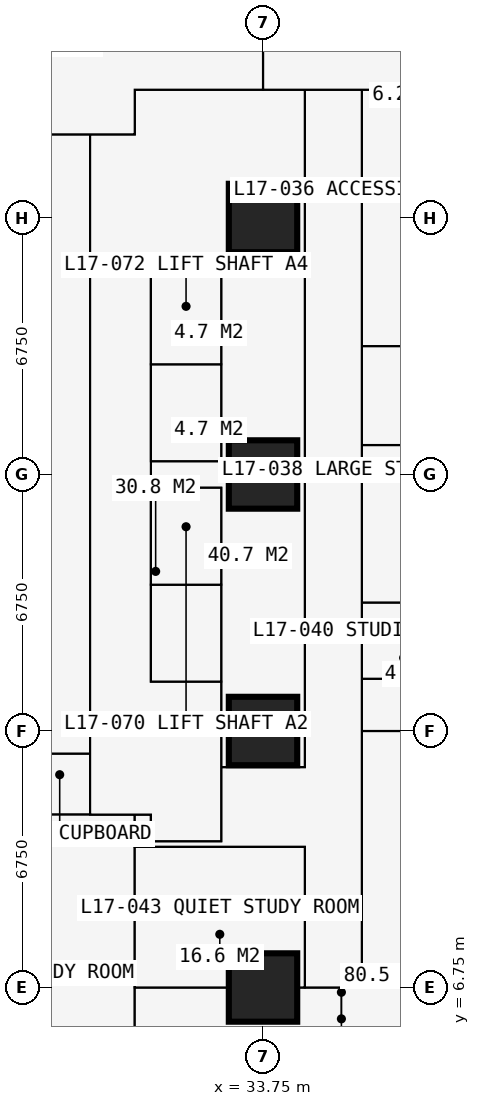
"""IFC4 building model, lengths in metres.
Left out: names, types, materials, properties, quantities, classifications, styles, units other than length and angle.
Written with IfcOpenShell. Run it as: python <this file> out.ifc"""

import sys

from ifc_helpers import new_model, si_unit, direction, frame, frame_2d, origin, origin_2d, place, context, subcontext, project, spatial, rectangle, extrude, element, fill, save


model = new_model("IFC4")
c1 = context("Model", 3, precision=1e-05, world=origin(), true_north=direction((0.0, 1.0)))
c2 = subcontext(c1, "Body", "Model", "MODEL_VIEW")
j1 = project(units=[si_unit("LENGTHUNIT", "METRE"), si_unit("PLANEANGLEUNIT", "RADIAN")], contexts=[c1])
p1 = place(None, origin())
s1 = spatial("IfcSite", under=j1, at=p1, CompositionType="ELEMENT")
p2 = place(p1, origin())
s2 = spatial("IfcBuilding", under=s1, at=p2, CompositionType="ELEMENT")
p3 = place(p2, frame((0.0, 0.0, 64.8)))
s3 = spatial("IfcBuildingStorey", under=s2, at=p3, CompositionType="ELEMENT", Elevation=64.8)
for number, where, z_axis, x_axis in (
    (1, (33.75, 6.75, 0.0), (0.0, 0.0, 1.0), (1.0, 0.0, 0.0)),
    (2, (33.75, 13.5, 0.0), (0.0, 0.0, 1.0), (1.0, 0.0, 0.0)),
    (3, (33.75, 20.25, 0.0), (0.0, 0.0, 1.0), (1.0, 0.0, 0.0)),
    (4, (33.75, 27.0, 0.0), (0.0, 0.0, 1.0), (1.0, 0.0, 0.0)),
):
    element("IfcColumn", number, at=place(p3, frame(where, z_axis=z_axis, x_axis=x_axis)), inside=s3, PredefinedType="COLUMN", context=c2, shape_type="SweptSolid", body=[
        extrude(rectangle(XDim=1.8, YDim=1.8, at=origin_2d()), origin(), (0.0, 0.0, 1.0), 3.6),
    ])
p4 = place(p3, frame((10.125, 11.3, 0.0), z_axis=(0.0, 0.0, 1.0), x_axis=(1.0, 0.0, 0.0)))
e5 = element("IfcWall", 5, at=p4, inside=s3, PredefinedType="PARTITIONING", context=c2, shape_type="SweptSolid", body=[
    extrude(rectangle(XDim=20.675, YDim=0.15, at=frame_2d((10.337, 0.0))), origin(), (0.0, 0.0, 1.0), 3.375),
])
p5 = place(p4, frame((8.375, 0.0, 0.0)))
e6 = element("IfcOpeningElement", 6, at=p5, cuts=e5, PredefinedType="OPENING", context=c2, shape_type="SweptSolid", body=[
    extrude(rectangle(XDim=1.0, YDim=2.2, at=frame_2d((0.5, 1.1))), frame((0.0, 0.085, 0.0), z_axis=(0.0, -1.0, 0.0), x_axis=(1.0, 0.0, 0.0)), (0.0, 0.0, 1.0), 0.17),
])
p6 = place(p4, frame((10.975, 0.0, 0.0)))
e7 = element("IfcOpeningElement", 7, at=p6, cuts=e5, PredefinedType="OPENING", context=c2, shape_type="SweptSolid", body=[
    extrude(rectangle(XDim=1.0, YDim=2.2, at=frame_2d((0.5, 1.1))), frame((0.0, 0.085, 0.0), z_axis=(0.0, -1.0, 0.0), x_axis=(1.0, 0.0, 0.0)), (0.0, 0.0, 1.0), 0.17),
])
p7 = place(p4, frame((3.925, 0.0, 0.0)))
e8 = element("IfcOpeningElement", 8, at=p7, cuts=e5, PredefinedType="OPENING", context=c2, shape_type="SweptSolid", body=[
    extrude(rectangle(XDim=0.95, YDim=2.2, at=frame_2d((0.475, 1.1))), frame((0.0, 0.085, 0.0), z_axis=(0.0, -1.0, 0.0), x_axis=(1.0, 0.0, 0.0)), (0.0, 0.0, 1.0), 0.17),
])
p8 = place(p3, frame((11.3, 29.2, 0.0), z_axis=(0.0, 0.0, 1.0), x_axis=(1.0, 0.0, 0.0)))
e9 = element("IfcWall", 9, at=p8, inside=s3, PredefinedType="PARTITIONING", context=c2, shape_type="SweptSolid", body=[
    extrude(rectangle(XDim=19.075, YDim=0.15, at=frame_2d((9.538, 0.0))), origin(), (0.0, 0.0, 1.0), 3.375),
])
p9 = place(p8, frame((10.137, 0.0, 0.0)))
e10 = element("IfcOpeningElement", 10, at=p9, cuts=e9, PredefinedType="OPENING", context=c2, shape_type="SweptSolid", body=[
    extrude(rectangle(XDim=1.0, YDim=2.2, at=frame_2d((0.5, 1.1))), frame((0.0, 0.085, 0.0), z_axis=(0.0, -1.0, 0.0), x_axis=(1.0, 0.0, 0.0)), (0.0, 0.0, 1.0), 0.17),
])
p10 = place(p3, frame((27.6, 12.9, 0.0), z_axis=(0.0, 0.0, 1.0), x_axis=(1.0, 0.0, 0.0)))
e11 = element("IfcWall", 11, at=p10, inside=s3, PredefinedType="PARTITIONING", context=c2, shape_type="SweptSolid", body=[
    extrude(rectangle(XDim=1.6, YDim=0.15, at=frame_2d((0.8, 0.0))), origin(), (0.0, 0.0, 1.0), 2.877),
])
p11 = place(p3, frame((29.2, 11.3, 0.0), z_axis=(0.0, 0.0, 1.0), x_axis=(0.0, 1.0, 0.0)))
e12 = element("IfcWall", 12, at=p11, inside=s3, PredefinedType="PARTITIONING", context=c2, shape_type="SweptSolid", body=[
    extrude(rectangle(XDim=17.9, YDim=0.2, at=frame_2d((8.95, 0.0))), origin(), (0.0, 0.0, 1.0), 3.375),
])
p12 = place(p11, frame((8.35, 0.0, 0.0)))
e13 = element("IfcOpeningElement", 13, at=p12, cuts=e12, PredefinedType="OPENING", context=c2, shape_type="SweptSolid", body=[
    extrude(rectangle(XDim=1.2, YDim=2.2, at=frame_2d((0.6, 1.1))), frame((0.0, 0.11, 0.0), z_axis=(0.0, -1.0, 0.0), x_axis=(1.0, 0.0, 0.0)), (0.0, 0.0, 1.0), 0.22),
])
p13 = place(p3, frame((29.2, 25.7, 0.0), z_axis=(0.0, 0.0, 1.0), x_axis=(1.0, 0.0, 0.0)))
e14 = element("IfcWall", 14, at=p13, inside=s3, PredefinedType="SHEAR", context=c2, shape_type="SweptSolid", body=[
    extrude(rectangle(XDim=3.45, YDim=0.1, at=frame_2d((1.725, 0.0))), origin(), (0.0, 0.0, 1.0), 3.375),
])
p14 = place(p3, frame((30.375, -0.734, 0.0), z_axis=(0.0, 0.0, 1.0), x_axis=(0.0, 1.0, 0.0)))
e15 = element("IfcWall", 15, at=p14, inside=s3, PredefinedType="PARTITIONING", context=c2, shape_type="SweptSolid", body=[
    extrude(rectangle(XDim=12.034, YDim=0.15, at=frame_2d((6.017, 0.0))), origin(), (0.0, 0.0, 1.0), 3.375),
])
p15 = place(p14, frame((5.134, 0.0, 0.0)))
e16 = element("IfcOpeningElement", 16, at=p15, cuts=e15, PredefinedType="OPENING", context=c2, shape_type="SweptSolid", body=[
    extrude(rectangle(XDim=1.0, YDim=2.2, at=frame_2d((0.5, 1.1))), frame((0.0, 0.085, 0.0), z_axis=(0.0, -1.0, 0.0), x_axis=(1.0, 0.0, 0.0)), (0.0, 0.0, 1.0), 0.17),
])
p16 = place(p3, frame((30.375, 6.75, 0.0), z_axis=(0.0, 0.0, 1.0), x_axis=(1.0, 0.0, 0.0)))
e17 = element("IfcWall", 17, at=p16, inside=s3, PredefinedType="PARTITIONING", context=c2, shape_type="SweptSolid", body=[
    extrude(rectangle(XDim=5.975, YDim=0.15, at=frame_2d((2.988, 0.0))), origin(), (0.0, 0.0, 1.0), 2.877),
])
p17 = place(p3, frame((30.375, 10.45, 0.0), z_axis=(0.0, 0.0, 1.0), x_axis=(1.0, 0.0, 0.0)))
e18 = element("IfcWall", 18, at=p17, inside=s3, PredefinedType="PARTITIONING", context=c2, shape_type="SweptSolid", body=[
    extrude(rectangle(XDim=4.475, YDim=0.15, at=frame_2d((2.238, 0.0))), origin(), (0.0, 0.0, 1.0), 3.375),
])
p18 = place(p17, frame((2.35, 0.0, 0.0)))
e19 = element("IfcOpeningElement", 19, at=p18, cuts=e18, PredefinedType="OPENING", context=c2, shape_type="SweptSolid", body=[
    extrude(rectangle(XDim=0.95, YDim=2.2, at=frame_2d((0.475, 1.1))), frame((0.0, 0.085, 0.0), z_axis=(0.0, -1.0, 0.0), x_axis=(1.0, 0.0, 0.0)), (0.0, 0.0, 1.0), 0.17),
])
p19 = place(p3, frame((30.375, 29.2, 0.0), z_axis=(0.0, 0.0, 1.0), x_axis=(0.0, 1.0, 0.0)))
e20 = element("IfcWall", 20, at=p19, inside=s3, PredefinedType="PARTITIONING", context=c2, shape_type="SweptSolid", body=[
    extrude(rectangle(XDim=1.175, YDim=0.15, at=frame_2d((0.587, 0.0))), origin(), (0.0, 0.0, 1.0), 3.375),
])
p20 = place(p3, frame((30.375, 30.375, 0.0), z_axis=(0.0, 0.0, 1.0), x_axis=(1.0, 0.0, 0.0)))
e21 = element("IfcWall", 21, at=p20, inside=s3, PredefinedType="PARTITIONING", context=c2, shape_type="SweptSolid", body=[
    extrude(rectangle(XDim=10.859, YDim=0.15, at=frame_2d((5.429, 0.0))), origin(), (0.0, 0.0, 1.0), 3.375),
])
p21 = place(p20, frame((4.725, 0.0, 0.0)))
e22 = element("IfcOpeningElement", 22, at=p21, cuts=e21, PredefinedType="OPENING", context=c2, shape_type="SweptSolid", body=[
    extrude(rectangle(XDim=1.0, YDim=2.2, at=frame_2d((0.5, 1.1))), frame((0.0, 0.085, 0.0), z_axis=(0.0, -1.0, 0.0), x_axis=(1.0, 0.0, 0.0)), (0.0, 0.0, 1.0), 0.17),
])
p22 = place(p3, frame((30.8, 10.6, 0.0), z_axis=(0.0, 0.0, 1.0), x_axis=(0.0, 1.0, 0.0)))
e23 = element("IfcWall", 23, at=p22, inside=s3, PredefinedType="PARTITIONING", context=c2, shape_type="SweptSolid", body=[
    extrude(rectangle(XDim=0.7, YDim=0.15, at=frame_2d((0.35, 0.0))), origin(), (0.0, 0.0, 1.0), 3.375),
])
p23 = place(p3, frame((30.8, 10.6, 0.0), z_axis=(0.0, 0.0, 1.0), x_axis=(1.0, 0.0, 0.0)))
e24 = element("IfcWall", 24, at=p23, inside=s3, PredefinedType="PARTITIONING", context=c2, shape_type="SweptSolid", body=[
    extrude(rectangle(XDim=1.85, YDim=0.15, at=frame_2d((0.925, 0.0))), origin(), (0.0, 0.0, 1.0), 3.375),
])
p24 = place(p3, frame((30.8, 14.8, 0.0), z_axis=(0.0, 0.0, 1.0), x_axis=(0.0, 1.0, 0.0)))
e25 = element("IfcWall", 25, at=p24, inside=s3, PredefinedType="PARTITIONING", context=c2, shape_type="SweptSolid", body=[
    extrude(rectangle(XDim=10.9, YDim=0.15, at=frame_2d((5.45, 0.0))), origin(), (0.0, 0.0, 1.0), 3.375),
])
p25 = place(p24, frame((0.75, 0.0, 0.0)))
e26 = element("IfcOpeningElement", 26, at=p25, cuts=e25, PredefinedType="OPENING", context=c2, shape_type="SweptSolid", body=[
    extrude(rectangle(XDim=1.1, YDim=2.2, at=frame_2d((0.55, 1.1))), frame((0.0, 0.085, 0.0), z_axis=(0.0, -1.0, 0.0), x_axis=(1.0, 0.0, 0.0)), (0.0, 0.0, 1.0), 0.17),
])
p26 = place(p24, frame((3.25, 0.0, 0.0)))
e27 = element("IfcOpeningElement", 27, at=p26, cuts=e25, PredefinedType="OPENING", context=c2, shape_type="SweptSolid", body=[
    extrude(rectangle(XDim=1.1, YDim=2.2, at=frame_2d((0.55, 1.1))), frame((0.0, 0.085, 0.0), z_axis=(0.0, -1.0, 0.0), x_axis=(1.0, 0.0, 0.0)), (0.0, 0.0, 1.0), 0.17),
])
p27 = place(p24, frame((6.5, 0.0, 0.0)))
e28 = element("IfcOpeningElement", 28, at=p27, cuts=e25, PredefinedType="OPENING", context=c2, shape_type="SweptSolid", body=[
    extrude(rectangle(XDim=1.1, YDim=2.2, at=frame_2d((0.55, 1.1))), frame((0.0, 0.085, 0.0), z_axis=(0.0, -1.0, 0.0), x_axis=(1.0, 0.0, 0.0)), (0.0, 0.0, 1.0), 0.17),
])
p28 = place(p24, frame((9.05, 0.0, 0.0)))
e29 = element("IfcOpeningElement", 29, at=p28, cuts=e25, PredefinedType="OPENING", context=c2, shape_type="SweptSolid", body=[
    extrude(rectangle(XDim=1.1, YDim=2.2, at=frame_2d((0.55, 1.1))), frame((0.0, 0.085, 0.0), z_axis=(0.0, -1.0, 0.0), x_axis=(1.0, 0.0, 0.0)), (0.0, 0.0, 1.0), 0.17),
])
for number, where, z_axis, x_axis in (
    (30, (30.8, 14.8, 0.0), (0.0, 0.0, 1.0), (1.0, 0.0, 0.0)),
    (31, (30.8, 17.35, 0.0), (0.0, 0.0, 1.0), (1.0, 0.0, 0.0)),
    (32, (30.8, 19.9, 0.0), (0.0, 0.0, 1.0), (1.0, 0.0, 0.0)),
    (33, (30.8, 20.6, 0.0), (0.0, 0.0, 1.0), (1.0, 0.0, 0.0)),
    (34, (30.8, 23.15, 0.0), (0.0, 0.0, 1.0), (1.0, 0.0, 0.0)),
):
    element("IfcWall", number, at=place(p3, frame(where, z_axis=z_axis, x_axis=x_axis)), inside=s3, PredefinedType="SHEAR", context=c2, shape_type="SweptSolid", body=[
        extrude(rectangle(XDim=1.85, YDim=0.1, at=frame_2d((0.925, 0.0))), origin(), (0.0, 0.0, 1.0), 3.375),
    ])
p29 = place(p3, frame((32.65, 10.6, 0.0), z_axis=(0.0, 0.0, 1.0), x_axis=(0.0, 1.0, 0.0)))
e35 = element("IfcWall", 35, at=p29, inside=s3, PredefinedType="SHEAR", context=c2, shape_type="SweptSolid", body=[
    extrude(rectangle(XDim=9.3, YDim=0.1, at=frame_2d((4.65, 0.0))), origin(), (0.0, 0.0, 1.0), 3.375),
])
p30 = place(p29, frame((0.5, 0.0, 0.0)))
e36 = element("IfcOpeningElement", 36, at=p30, cuts=e35, PredefinedType="OPENING", context=c2, shape_type="SweptSolid", body=[
    extrude(rectangle(XDim=1.0, YDim=2.2, at=frame_2d((0.5, 1.1))), frame((0.0, 0.06, 0.0), z_axis=(0.0, -1.0, 0.0), x_axis=(1.0, 0.0, 0.0)), (0.0, 0.0, 1.0), 0.12),
])
p31 = place(p3, frame((32.65, 12.55, 0.0), z_axis=(0.0, 0.0, 1.0), x_axis=(1.0, 0.0, 0.0)))
e37 = element("IfcWall", 37, at=p31, inside=s3, PredefinedType="PARTITIONING", context=c2, shape_type="SweptSolid", body=[
    extrude(rectangle(XDim=2.2, YDim=0.15, at=frame_2d((1.1, 0.0))), origin(), (0.0, 0.0, 1.0), 3.375),
])
p32 = place(p3, frame((32.65, 20.6, 0.0), z_axis=(0.0, 0.0, 1.0), x_axis=(0.0, 1.0, 0.0)))
e38 = element("IfcWall", 38, at=p32, inside=s3, PredefinedType="PARTITIONING", context=c2, shape_type="SweptSolid", body=[
    extrude(rectangle(XDim=5.1, YDim=0.15, at=frame_2d((2.55, 0.0))), origin(), (0.0, 0.0, 1.0), 3.375),
])
p33 = place(p3, frame((33.75, 30.375, 0.0), z_axis=(0.0, 0.0, 1.0), x_axis=(0.0, 1.0, 0.0)))
e39 = element("IfcWall", 39, at=p33, inside=s3, PredefinedType="PARTITIONING", context=c2, shape_type="SweptSolid", body=[
    extrude(rectangle(XDim=5.975, YDim=0.15, at=frame_2d((2.988, 0.0))), origin(), (0.0, 0.0, 1.0), 2.877),
])
p34 = place(p3, frame((34.85, 6.75, 0.0), z_axis=(0.0, 0.0, 1.0), x_axis=(0.0, 1.0, 0.0)))
e40 = element("IfcWall", 40, at=p34, inside=s3, PredefinedType="PARTITIONING", context=c2, shape_type="SweptSolid", body=[
    extrude(rectangle(XDim=3.7, YDim=0.15, at=frame_2d((1.85, 0.0))), origin(), (0.0, 0.0, 1.0), 3.375),
])
p35 = place(p3, frame((34.85, 12.55, 0.0), z_axis=(0.0, 0.0, 1.0), x_axis=(0.0, 1.0, 0.0)))
e41 = element("IfcWall", 41, at=p35, inside=s3, PredefinedType="PARTITIONING", context=c2, shape_type="SweptSolid", body=[
    extrude(rectangle(XDim=17.825, YDim=0.15, at=frame_2d((8.913, 0.0))), origin(), (0.0, 0.0, 1.0), 3.375),
])
p36 = place(p35, frame((8.6, 0.0, 0.0)))
e42 = element("IfcOpeningElement", 42, at=p36, cuts=e41, PredefinedType="OPENING", context=c2, shape_type="SweptSolid", body=[
    extrude(rectangle(XDim=0.95, YDim=2.2, at=frame_2d((0.475, 1.1))), frame((0.0, 0.085, 0.0), z_axis=(0.0, -1.0, 0.0), x_axis=(1.0, 0.0, 0.0)), (0.0, 0.0, 1.0), 0.17),
])
p37 = place(p3, frame((36.35, 6.75, 0.0), z_axis=(0.0, 0.0, 1.0), x_axis=(0.0, 1.0, 0.0)))
e43 = element("IfcWall", 43, at=p37, inside=s3, PredefinedType="PARTITIONING", context=c2, shape_type="SweptSolid", body=[
    extrude(rectangle(XDim=23.625, YDim=0.15, at=frame_2d((11.812, 0.0))), origin(), (0.0, 0.0, 1.0), 3.375),
])
p38 = place(p37, frame((18.475, 0.0, 0.0)))
e44 = element("IfcOpeningElement", 44, at=p38, cuts=e43, PredefinedType="OPENING", context=c2, shape_type="SweptSolid", body=[
    extrude(rectangle(XDim=0.95, YDim=2.2, at=frame_2d((0.475, 1.1))), frame((0.0, 0.085, 0.0), z_axis=(0.0, -1.0, 0.0), x_axis=(1.0, 0.0, 0.0)), (0.0, 0.0, 1.0), 0.17),
])
p39 = place(p37, frame((11.725, 0.0, 0.0)))
e45 = element("IfcOpeningElement", 45, at=p39, cuts=e43, PredefinedType="OPENING", context=c2, shape_type="SweptSolid", body=[
    extrude(rectangle(XDim=0.95, YDim=2.2, at=frame_2d((0.475, 1.1))), frame((0.0, 0.085, 0.0), z_axis=(0.0, -1.0, 0.0), x_axis=(1.0, 0.0, 0.0)), (0.0, 0.0, 1.0), 0.17),
])
p40 = place(p37, frame((6.95, 0.0, 0.0)))
e46 = element("IfcOpeningElement", 46, at=p40, cuts=e43, PredefinedType="OPENING", context=c2, shape_type="SweptSolid", body=[
    extrude(rectangle(XDim=0.95, YDim=2.2, at=frame_2d((0.475, 1.1))), frame((0.0, 0.085, 0.0), z_axis=(0.0, -1.0, 0.0), x_axis=(1.0, 0.0, 0.0)), (0.0, 0.0, 1.0), 0.17),
])
p41 = place(p3, frame((36.35, 13.5, 0.0), z_axis=(0.0, 0.0, 1.0), x_axis=(1.0, 0.0, 0.0)))
e47 = element("IfcWall", 47, at=p41, inside=s3, PredefinedType="PARTITIONING", context=c2, shape_type="SweptSolid", body=[
    extrude(rectangle(XDim=4.884, YDim=0.15, at=frame_2d((2.442, 0.0))), origin(), (0.0, 0.0, 1.0), 2.61),
])
p42 = place(p3, frame((36.35, 14.875, 0.0), z_axis=(0.0, 0.0, 1.0), x_axis=(1.0, 0.0, 0.0)))
e48 = element("IfcWall", 48, at=p42, inside=s3, PredefinedType="PARTITIONING", context=c2, shape_type="SweptSolid", body=[
    extrude(rectangle(XDim=2.2, YDim=0.1, at=frame_2d((1.1, 0.0))), origin(), (0.0, 0.0, 1.0), 3.375),
])
p43 = place(p3, frame((36.35, 16.875, 0.0), z_axis=(0.0, 0.0, 1.0), x_axis=(1.0, 0.0, 0.0)))
e49 = element("IfcWall", 49, at=p43, inside=s3, PredefinedType="PARTITIONING", context=c2, shape_type="SweptSolid", body=[
    extrude(rectangle(XDim=4.884, YDim=0.175, at=frame_2d((2.442, 0.0))), origin(), (0.0, 0.0, 1.0), 3.375),
])
p44 = place(p43, frame((0.65, 0.0, 0.0)))
e50 = element("IfcOpeningElement", 50, at=p44, cuts=e49, PredefinedType="OPENING", context=c2, shape_type="SweptSolid", body=[
    extrude(rectangle(XDim=0.9, YDim=2.2, at=frame_2d((0.45, 1.1))), frame((0.0, 0.097, 0.0), z_axis=(0.0, -1.0, 0.0), x_axis=(1.0, 0.0, 0.0)), (0.0, 0.0, 1.0), 0.195),
])
p45 = place(p3, frame((36.35, 21.025, 0.0), z_axis=(0.0, 0.0, 1.0), x_axis=(1.0, 0.0, 0.0)))
e51 = element("IfcWall", 51, at=p45, inside=s3, PredefinedType="PARTITIONING", context=c2, shape_type="SweptSolid", body=[
    extrude(rectangle(XDim=2.4, YDim=0.1, at=frame_2d((1.2, 0.0))), origin(), (0.0, 0.0, 1.0), 3.375),
])
p46 = place(p3, frame((36.35, 23.625, 0.0), z_axis=(0.0, 0.0, 1.0), x_axis=(1.0, 0.0, 0.0)))
e52 = element("IfcWall", 52, at=p46, inside=s3, PredefinedType="PARTITIONING", context=c2, shape_type="SweptSolid", body=[
    extrude(rectangle(XDim=4.884, YDim=0.175, at=frame_2d((2.442, 0.0))), origin(), (0.0, 0.0, 1.0), 3.375),
])
p47 = place(p46, frame((0.75, 0.0, 0.0)))
e53 = element("IfcOpeningElement", 53, at=p47, cuts=e52, PredefinedType="OPENING", context=c2, shape_type="SweptSolid", body=[
    extrude(rectangle(XDim=0.9, YDim=2.2, at=frame_2d((0.45, 1.1))), frame((0.0, 0.097, 0.0), z_axis=(0.0, -1.0, 0.0), x_axis=(1.0, 0.0, 0.0)), (0.0, 0.0, 1.0), 0.195),
])
p48 = place(p3, frame((36.35, 27.775, 0.0), z_axis=(0.0, 0.0, 1.0), x_axis=(1.0, 0.0, 0.0)))
e54 = element("IfcWall", 54, at=p48, inside=s3, PredefinedType="PARTITIONING", context=c2, shape_type="SweptSolid", body=[
    extrude(rectangle(XDim=2.4, YDim=0.1, at=frame_2d((1.2, 0.0))), origin(), (0.0, 0.0, 1.0), 3.375),
])
p49 = place(p38, origin())
e55 = element("IfcDoor", 55, at=p49, inside=s3, OperationType="SINGLE_SWING_LEFT", PredefinedType="DOOR", context=c2, shape_type="SweptSolid", body=[
    extrude(rectangle(XDim=0.95, YDim=2.2, at=frame_2d((0.475, 1.1))), frame((0.0, 0.025, 0.0), z_axis=(0.0, -1.0, 0.0), x_axis=(1.0, 0.0, 0.0)), (0.0, 0.0, 1.0), 0.05),
])
fill(e44, e55)
p50 = place(p39, origin())
e56 = element("IfcDoor", 56, at=p50, inside=s3, OperationType="SINGLE_SWING_LEFT", PredefinedType="DOOR", context=c2, shape_type="SweptSolid", body=[
    extrude(rectangle(XDim=0.95, YDim=2.2, at=frame_2d((0.475, 1.1))), frame((0.0, 0.025, 0.0), z_axis=(0.0, -1.0, 0.0), x_axis=(1.0, 0.0, 0.0)), (0.0, 0.0, 1.0), 0.05),
])
fill(e45, e56)
p51 = place(p47, origin())
e57 = element("IfcDoor", 57, at=p51, inside=s3, OperationType="SINGLE_SWING_RIGHT", PredefinedType="DOOR", context=c2, shape_type="SweptSolid", body=[
    extrude(rectangle(XDim=0.9, YDim=2.2, at=frame_2d((0.45, 1.1))), frame((0.0, 0.025, 0.0), z_axis=(0.0, -1.0, 0.0), x_axis=(1.0, 0.0, 0.0)), (0.0, 0.0, 1.0), 0.05),
])
fill(e53, e57)
p52 = place(p40, origin())
e58 = element("IfcDoor", 58, at=p52, inside=s3, OperationType="SINGLE_SWING_LEFT", PredefinedType="DOOR", context=c2, shape_type="SweptSolid", body=[
    extrude(rectangle(XDim=0.95, YDim=2.2, at=frame_2d((0.475, 1.1))), frame((0.0, 0.025, 0.0), z_axis=(0.0, -1.0, 0.0), x_axis=(1.0, 0.0, 0.0)), (0.0, 0.0, 1.0), 0.05),
])
fill(e46, e58)
p53 = place(p44, origin())
e59 = element("IfcDoor", 59, at=p53, inside=s3, OperationType="SINGLE_SWING_RIGHT", PredefinedType="DOOR", context=c2, shape_type="SweptSolid", body=[
    extrude(rectangle(XDim=0.9, YDim=2.2, at=frame_2d((0.45, 1.1))), frame((0.0, 0.025, 0.0), z_axis=(0.0, -1.0, 0.0), x_axis=(1.0, 0.0, 0.0)), (0.0, 0.0, 1.0), 0.05),
])
fill(e50, e59)
p54 = place(p30, origin())
e60 = element("IfcDoor", 60, at=p54, inside=s3, OperationType="SINGLE_SWING_LEFT", PredefinedType="DOOR", context=c2, shape_type="SweptSolid", body=[
    extrude(rectangle(XDim=1.0, YDim=2.2, at=frame_2d((0.5, 1.1))), frame((0.0, 0.025, 0.0), z_axis=(0.0, -1.0, 0.0), x_axis=(1.0, 0.0, 0.0)), (0.0, 0.0, 1.0), 0.05),
])
fill(e36, e60)
p55 = place(p36, origin())
e61 = element("IfcDoor", 61, at=p55, inside=s3, OperationType="SINGLE_SWING_LEFT", PredefinedType="DOOR", context=c2, shape_type="SweptSolid", body=[
    extrude(rectangle(XDim=0.95, YDim=2.2, at=frame_2d((0.475, 1.1))), frame((0.0, 0.025, 0.0), z_axis=(0.0, -1.0, 0.0), x_axis=(1.0, 0.0, 0.0)), (0.0, 0.0, 1.0), 0.05),
])
fill(e42, e61)
p56 = place(p18, origin())
e62 = element("IfcDoor", 62, at=p56, inside=s3, OperationType="SINGLE_SWING_LEFT", PredefinedType="DOOR", context=c2, shape_type="SweptSolid", body=[
    extrude(rectangle(XDim=0.95, YDim=2.2, at=frame_2d((0.475, 1.1))), frame((0.0, 0.025, 0.0), z_axis=(0.0, -1.0, 0.0), x_axis=(1.0, 0.0, 0.0)), (0.0, 0.0, 1.0), 0.05),
])
fill(e19, e62)
p57 = place(p21, origin())
e63 = element("IfcDoor", 63, at=p57, inside=s3, OperationType="SINGLE_SWING_LEFT", PredefinedType="DOOR", context=c2, shape_type="SweptSolid", body=[
    extrude(rectangle(XDim=1.0, YDim=2.2, at=frame_2d((0.5, 1.1))), frame((0.0, 0.025, 0.0), z_axis=(0.0, -1.0, 0.0), x_axis=(1.0, 0.0, 0.0)), (0.0, 0.0, 1.0), 0.05),
])
fill(e22, e63)
p58 = place(p25, origin())
e64 = element("IfcDoor", 64, at=p58, inside=s3, OperationType="DOUBLE_DOOR_SLIDING", PredefinedType="DOOR", context=c2, shape_type="SweptSolid", body=[
    extrude(rectangle(XDim=1.1, YDim=2.2, at=frame_2d((0.55, 1.1))), frame((0.0, 0.025, 0.0), z_axis=(0.0, -1.0, 0.0), x_axis=(1.0, 0.0, 0.0)), (0.0, 0.0, 1.0), 0.05),
])
fill(e26, e64)
p59 = place(p26, origin())
e65 = element("IfcDoor", 65, at=p59, inside=s3, OperationType="DOUBLE_DOOR_SLIDING", PredefinedType="DOOR", context=c2, shape_type="SweptSolid", body=[
    extrude(rectangle(XDim=1.1, YDim=2.2, at=frame_2d((0.55, 1.1))), frame((0.0, 0.025, 0.0), z_axis=(0.0, -1.0, 0.0), x_axis=(1.0, 0.0, 0.0)), (0.0, 0.0, 1.0), 0.05),
])
fill(e27, e65)
p60 = place(p27, origin())
e66 = element("IfcDoor", 66, at=p60, inside=s3, OperationType="DOUBLE_DOOR_SLIDING", PredefinedType="DOOR", context=c2, shape_type="SweptSolid", body=[
    extrude(rectangle(XDim=1.1, YDim=2.2, at=frame_2d((0.55, 1.1))), frame((0.0, 0.025, 0.0), z_axis=(0.0, -1.0, 0.0), x_axis=(1.0, 0.0, 0.0)), (0.0, 0.0, 1.0), 0.05),
])
fill(e28, e66)
p61 = place(p28, origin())
e67 = element("IfcDoor", 67, at=p61, inside=s3, OperationType="DOUBLE_DOOR_SLIDING", PredefinedType="DOOR", context=c2, shape_type="SweptSolid", body=[
    extrude(rectangle(XDim=1.1, YDim=2.2, at=frame_2d((0.55, 1.1))), frame((0.0, 0.025, 0.0), z_axis=(0.0, -1.0, 0.0), x_axis=(1.0, 0.0, 0.0)), (0.0, 0.0, 1.0), 0.05),
])
fill(e29, e67)
p62 = place(p12, origin())
e68 = element("IfcDoor", 68, at=p62, inside=s3, OperationType="DOUBLE_DOOR_SINGLE_SWING", PredefinedType="DOOR", context=c2, shape_type="SweptSolid", body=[
    extrude(rectangle(XDim=1.2, YDim=2.2, at=frame_2d((0.6, 1.1))), frame((0.0, 0.025, 0.0), z_axis=(0.0, -1.0, 0.0), x_axis=(1.0, 0.0, 0.0)), (0.0, 0.0, 1.0), 0.05),
])
fill(e13, e68)
save(model, sys.argv[1])
